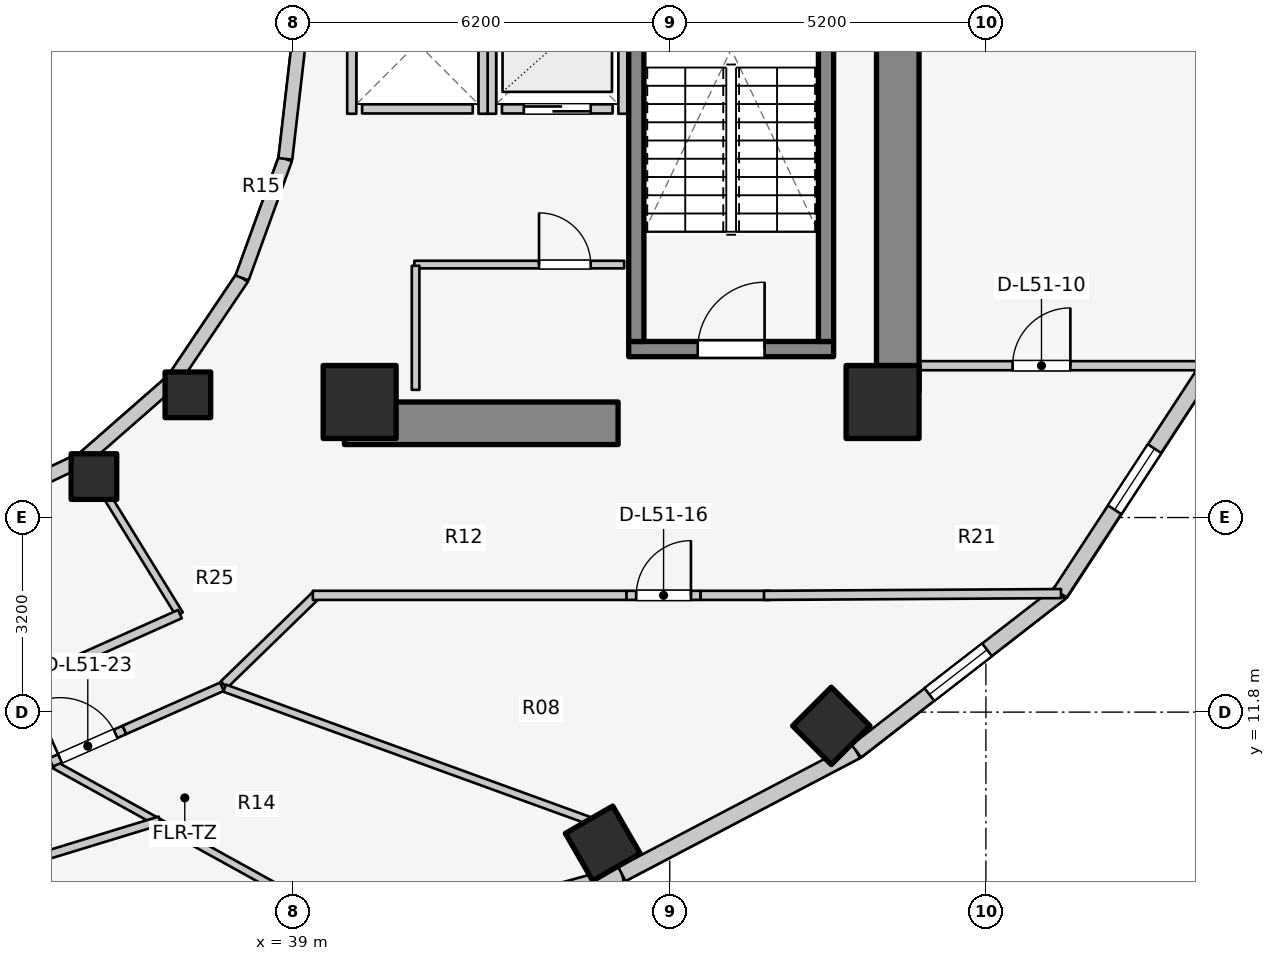
"""IFC4 building model, lengths in metres.
Left out: names, types, materials, properties, quantities, classifications, styles, units other than length and angle.
Written with IfcOpenShell. Run it as: python <this file> out.ifc"""

import sys

from ifc_helpers import new_model, si_unit, direction, frame, frame_2d, origin, origin_2d, place, context, subcontext, project, spatial, rectangle, extrude, element, fill, save


model = new_model("IFC4")
c1 = context("Model", 3, precision=1e-05, world=origin(), true_north=direction((0.0, 1.0)))
c2 = subcontext(c1, "Body", "Model", "MODEL_VIEW")
j1 = project(units=[si_unit("LENGTHUNIT", "METRE"), si_unit("PLANEANGLEUNIT", "RADIAN")], contexts=[c1])
p1 = place(None, origin())
s1 = spatial("IfcSite", under=j1, at=p1, CompositionType="ELEMENT")
p2 = place(p1, origin())
s2 = spatial("IfcBuilding", under=s1, at=p2, CompositionType="ELEMENT")
p3 = place(p2, frame((0.0, 0.0, 168.4)))
s3 = spatial("IfcBuildingStorey", under=s2, at=p3, CompositionType="ELEMENT", Elevation=168.4)
p4 = place(p3, frame((48.95, 17.05, 0.0), z_axis=(0.0, 0.0, 1.0), x_axis=(0.0, 1.0, 0.0)))
e1 = element("IfcWall", 1, at=p4, inside=s3, PredefinedType="SHEAR", context=c2, shape_type="SweptSolid", body=[
    extrude(rectangle(XDim=12.8, YDim=0.7, at=frame_2d((6.4, 0.0))), origin(), (0.0, 0.0, 1.0), 3.1),
])
p5 = place(p3, frame((39.85, 16.55, 0.0), z_axis=(0.0, 0.0, 1.0), x_axis=(1.0, 0.0, 0.0)))
e2 = element("IfcWall", 2, at=p5, inside=s3, PredefinedType="SHEAR", context=c2, shape_type="SweptSolid", body=[
    extrude(rectangle(XDim=4.5, YDim=0.7, at=frame_2d((2.25, 0.0))), origin(), (0.0, 0.0, 1.0), 3.1),
])
p6 = place(p3, frame((44.525, 17.77, 0.0), z_axis=(0.0, 0.0, 1.0), x_axis=(1.0, 0.0, 0.0)))
e3 = element("IfcWall", 3, at=p6, inside=s3, PredefinedType="SOLIDWALL", context=c2, shape_type="SweptSolid", body=[
    extrude(rectangle(XDim=3.37, YDim=0.25, at=frame_2d((1.685, 0.0))), origin(), (0.0, 0.0, 1.0), 3.1),
])
p7 = place(p6, frame((1.135, 0.0, 0.0)))
e4 = element("IfcOpeningElement", 4, at=p7, cuts=e3, PredefinedType="OPENING", context=c2, shape_type="SweptSolid", body=[
    extrude(rectangle(XDim=1.1, YDim=2.1, at=frame_2d((0.55, 1.05))), frame((0.0, 0.135, 0.0), z_axis=(0.0, -1.0, 0.0), x_axis=(1.0, 0.0, 0.0)), (0.0, 0.0, 1.0), 0.27),
])
for number, where, z_axis, x_axis in (
    (5, (44.65, 17.895, 0.0), (0.0, 0.0, 1.0), (0.0, 1.0, 0.0)),
    (6, (47.77, 17.895, 0.0), (0.0, 0.0, 1.0), (0.0, 1.0, 0.0)),
):
    element("IfcWall", number, at=place(p3, frame(where, z_axis=z_axis, x_axis=x_axis)), inside=s3, PredefinedType="SOLIDWALL", context=c2, shape_type="SweptSolid", body=[
        extrude(rectangle(XDim=7.81, YDim=0.25, at=frame_2d((3.905, 0.0))), origin(), (0.0, 0.0, 1.0), 3.1),
    ])
for number, where, z_axis, x_axis in (
    (7, (40.1, 16.9, 0.0), (0.0, 0.0, 1.0), (1.0, 0.0, 0.0)),
    (8, (48.7, 16.9, 0.0), (0.0, 0.0, 1.0), (1.0, 0.0, 0.0)),
):
    element("IfcColumn", number, at=place(p3, frame(where, z_axis=z_axis, x_axis=x_axis)), inside=s3, PredefinedType="COLUMN", context=c2, shape_type="SweptSolid", body=[
        extrude(rectangle(XDim=1.2, YDim=1.2, at=origin_2d()), origin(), (0.0, 0.0, 1.0), 3.1),
    ])
p8 = place(p3, frame((35.73, 15.673, 0.0), z_axis=(0.0, 0.0, 1.0), x_axis=(1.0, 0.0, 0.0)))
e9 = element("IfcColumn", 9, at=p8, inside=s3, PredefinedType="COLUMN", context=c2, shape_type="SweptSolid", body=[
    extrude(rectangle(XDim=0.75, YDim=0.75, at=origin_2d()), origin(), (0.0, 0.0, 1.0), 3.1),
])
p9 = place(p3, frame((44.098, 9.641, 0.0), z_axis=(0.0, 0.0, 1.0), x_axis=(0.5, -0.866025403784, 0.0)))
e10 = element("IfcColumn", 10, at=p9, inside=s3, PredefinedType="COLUMN", context=c2, shape_type="SweptSolid", body=[
    extrude(rectangle(XDim=0.9, YDim=0.9, at=origin_2d()), origin(), (0.0, 0.0, 1.0), 3.1),
])
p10 = place(p3, frame((37.275, 17.018, 0.0), z_axis=(0.0, 0.0, 1.0), x_axis=(1.0, 0.0, 0.0)))
e11 = element("IfcColumn", 11, at=p10, inside=s3, PredefinedType="COLUMN", context=c2, shape_type="SweptSolid", body=[
    extrude(rectangle(XDim=0.75, YDim=0.75, at=origin_2d()), origin(), (0.0, 0.0, 1.0), 3.1),
])
p11 = place(p3, frame((47.857, 11.573, 0.0), z_axis=(0.0, 0.0, 1.0), x_axis=(0.707106781187, -0.707106781187, 0.0)))
e12 = element("IfcColumn", 12, at=p11, inside=s3, PredefinedType="COLUMN", context=c2, shape_type="SweptSolid", body=[
    extrude(rectangle(XDim=0.9, YDim=0.9, at=origin_2d()), origin(), (0.0, 0.0, 1.0), 3.1),
])
p12 = place(p3, frame((33.843, 15.157, 0.0), z_axis=(0.0, 0.0, 1.0), x_axis=(0.904179699603, 0.427152280606, 0.0)))
e13 = element("IfcWall", 13, at=p12, inside=s3, PredefinedType="STANDARD", context=c2, shape_type="SweptSolid", body=[
    extrude(rectangle(XDim=1.899, YDim=0.23, at=frame_2d((0.95, 0.0))), origin(), (0.0, 0.0, 1.0), 1.22),
])
p13 = place(p3, frame((35.56, 15.968, 0.0), z_axis=(0.0, 0.0, 1.0), x_axis=(0.752576694707, 0.658504607869, 0.0)))
e14 = element("IfcWall", 14, at=p13, inside=s3, PredefinedType="STANDARD", context=c2, shape_type="SweptSolid", body=[
    extrude(rectangle(XDim=1.959, YDim=0.23, at=frame_2d((0.98, 0.0))), origin(), (0.0, 0.0, 1.0), 1.22),
])
p14 = place(p3, frame((37.035, 17.258, 0.0), z_axis=(0.0, 0.0, 1.0), x_axis=(0.558197800898, 0.829707909492, 0.0)))
e15 = element("IfcWall", 15, at=p14, inside=s3, PredefinedType="STANDARD", context=c2, shape_type="SweptSolid", body=[
    extrude(rectangle(XDim=2.027, YDim=0.23, at=frame_2d((1.013, 0.0))), origin(), (0.0, 0.0, 1.0), 1.22),
])
p15 = place(p3, frame((38.166, 18.94, 0.0), z_axis=(0.0, 0.0, 1.0), x_axis=(0.341423187295, 0.93990968033, 0.0)))
e16 = element("IfcWall", 16, at=p15, inside=s3, PredefinedType="STANDARD", context=c2, shape_type="SweptSolid", body=[
    extrude(rectangle(XDim=2.084, YDim=0.23, at=frame_2d((1.042, 0.0))), origin(), (0.0, 0.0, 1.0), 2.56),
])
p16 = place(p3, frame((38.877, 20.898, 0.0), z_axis=(0.0, 0.0, 1.0), x_axis=(0.114711713601, 0.993398823617, 0.0)))
e17 = element("IfcWall", 17, at=p16, inside=s3, PredefinedType="STANDARD", context=c2, shape_type="SweptSolid", body=[
    extrude(rectangle(XDim=2.115, YDim=0.23, at=frame_2d((1.058, 0.0))), origin(), (0.0, 0.0, 1.0), 2.56),
])
p17 = place(p3, frame((39.365, 7.743, 0.0), z_axis=(0.0, 0.0, 1.0), x_axis=(0.963953455704, 0.26607092144, 0.0)))
e18 = element("IfcWall", 18, at=p17, inside=s3, PredefinedType="STANDARD", context=c2, shape_type="SweptSolid", body=[
    extrude(rectangle(XDim=5.237, YDim=0.26, at=frame_2d((2.618, 0.0))), origin(), (0.0, 0.0, 1.0), 1.22),
])
p18 = place(p17, frame((2.018, 0.0, 0.15)))
e19 = element("IfcOpeningElement", 19, at=p18, cuts=e18, PredefinedType="OPENING", context=c2, shape_type="SweptSolid", body=[
    extrude(rectangle(XDim=1.2, YDim=0.9, at=frame_2d((0.6, 0.45))), frame((0.0, 0.14, 0.0), z_axis=(0.0, -1.0, 0.0), x_axis=(1.0, 0.0, 0.0)), (0.0, 0.0, 1.0), 0.28),
])
p19 = place(p3, frame((44.413, 9.137, 0.0), z_axis=(0.0, 0.0, 1.0), x_axis=(0.885660265226, 0.464333818065, 0.0)))
e20 = element("IfcWall", 20, at=p19, inside=s3, PredefinedType="STANDARD", context=c2, shape_type="SweptSolid", body=[
    extrude(rectangle(XDim=4.354, YDim=0.26, at=frame_2d((2.177, 0.0))), origin(), (0.0, 0.0, 1.0), 1.22),
])
p20 = place(p3, frame((48.269, 11.158, 0.0), z_axis=(0.0, 0.0, 1.0), x_axis=(0.790185650662, 0.612867552973, 0.0)))
e21 = element("IfcWall", 21, at=p20, inside=s3, PredefinedType="STANDARD", context=c2, shape_type="SweptSolid", body=[
    extrude(rectangle(XDim=4.239, YDim=0.26, at=frame_2d((2.12, 0.0))), origin(), (0.0, 0.0, 1.0), 1.22),
])
p21 = place(p20, frame((1.52, 0.0, 0.15)))
e22 = element("IfcOpeningElement", 22, at=p21, cuts=e21, PredefinedType="OPENING", context=c2, shape_type="SweptSolid", body=[
    extrude(rectangle(XDim=1.2, YDim=0.9, at=frame_2d((0.6, 0.45))), frame((0.0, 0.14, 0.0), z_axis=(0.0, -1.0, 0.0), x_axis=(1.0, 0.0, 0.0)), (0.0, 0.0, 1.0), 0.28),
])
p22 = place(p3, frame((51.619, 13.757, 0.0), z_axis=(0.0, 0.0, 1.0), x_axis=(0.547456494366, 0.836834145322, 0.0)))
e23 = element("IfcWall", 23, at=p22, inside=s3, PredefinedType="STANDARD", context=c2, shape_type="SweptSolid", body=[
    extrude(rectangle(XDim=4.477, YDim=0.26, at=frame_2d((2.239, 0.0))), origin(), (0.0, 0.0, 1.0), 1.22),
])
p23 = place(p22, frame((1.639, 0.0, 0.15)))
e24 = element("IfcOpeningElement", 24, at=p23, cuts=e23, PredefinedType="OPENING", context=c2, shape_type="SweptSolid", body=[
    extrude(rectangle(XDim=1.2, YDim=0.9, at=frame_2d((0.6, 0.45))), frame((0.0, 0.14, 0.0), z_axis=(0.0, -1.0, 0.0), x_axis=(1.0, 0.0, 0.0)), (0.0, 0.0, 1.0), 0.28),
])
p24 = place(p3, frame((42.44, 21.72, 0.0), z_axis=(0.0, 0.0, 1.0), x_axis=(1.0, 0.0, 0.0)))
e25 = element("IfcWall", 25, at=p24, inside=s3, PredefinedType="SOLIDWALL", context=c2, shape_type="SweptSolid", body=[
    extrude(rectangle(XDim=1.82, YDim=0.15, at=frame_2d((0.91, 0.0))), origin(), (0.0, 0.0, 1.0), 2.575),
])
p25 = place(p24, frame((0.36, 0.0, 0.0)))
e26 = element("IfcOpeningElement", 26, at=p25, cuts=e25, PredefinedType="OPENING", context=c2, shape_type="SweptSolid", body=[
    extrude(rectangle(XDim=1.1, YDim=2.1, at=frame_2d((0.55, 1.05))), frame((0.0, 0.085, 0.0), z_axis=(0.0, -1.0, 0.0), x_axis=(1.0, 0.0, 0.0)), (0.0, 0.0, 1.0), 0.17),
])
for number, where, z_axis, x_axis in (
    (27, (42.27, 21.64, 0.0), (0.0, 0.0, 1.0), (0.0, 1.0, 0.0)),
    (28, (44.43, 21.64, 0.0), (0.0, 0.0, 1.0), (0.0, 1.0, 0.0)),
):
    element("IfcWall", number, at=place(p3, frame(where, z_axis=z_axis, x_axis=x_axis)), inside=s3, PredefinedType="SOLIDWALL", context=c2, shape_type="SweptSolid", body=[
        extrude(rectangle(XDim=2.32, YDim=0.15, at=frame_2d((1.16, 0.0))), origin(), (0.0, 0.0, 1.0), 2.575),
    ])
p26 = place(p3, frame((40.14, 21.72, 0.0), z_axis=(0.0, 0.0, 1.0), x_axis=(1.0, 0.0, 0.0)))
e29 = element("IfcWall", 29, at=p26, inside=s3, PredefinedType="SOLIDWALL", context=c2, shape_type="SweptSolid", body=[
    extrude(rectangle(XDim=1.82, YDim=0.15, at=frame_2d((0.91, 0.0))), origin(), (0.0, 0.0, 1.0), 2.12),
])
p27 = place(p3, frame((39.97, 21.64, 0.0), z_axis=(0.0, 0.0, 1.0), x_axis=(0.0, 1.0, 0.0)))
e30 = element("IfcWall", 30, at=p27, inside=s3, PredefinedType="SOLIDWALL", context=c2, shape_type="SweptSolid", body=[
    extrude(rectangle(XDim=2.32, YDim=0.15, at=frame_2d((1.16, 0.0))), origin(), (0.0, 0.0, 1.0), 2.12),
])
p28 = place(p3, frame((42.13, 21.64, 0.0), z_axis=(0.0, 0.0, 1.0), x_axis=(0.0, 1.0, 0.0)))
e31 = element("IfcWall", 31, at=p28, inside=s3, PredefinedType="SOLIDWALL", context=c2, shape_type="SweptSolid", body=[
    extrude(rectangle(XDim=2.32, YDim=0.15, at=frame_2d((1.16, 0.0))), origin(), (0.0, 0.0, 1.0), 2.575),
])
p29 = place(p3, frame((41.0, 19.16, 0.0), z_axis=(0.0, 0.0, 1.0), x_axis=(1.0, 0.0, 0.0)))
e32 = element("IfcWall", 32, at=p29, inside=s3, PredefinedType="PARTITIONING", context=c2, shape_type="SweptSolid", body=[
    extrude(rectangle(XDim=3.45, YDim=0.125, at=frame_2d((1.725, 0.0))), origin(), (0.0, 0.0, 1.0), 2.12),
])
p30 = place(p29, frame((2.05, 0.0, 0.0)))
e33 = element("IfcOpeningElement", 33, at=p30, cuts=e32, PredefinedType="OPENING", context=c2, shape_type="SweptSolid", body=[
    extrude(rectangle(XDim=0.85, YDim=2.05, at=frame_2d((0.425, 1.025))), frame((0.0, 0.073, 0.0), z_axis=(0.0, -1.0, 0.0), x_axis=(1.0, 0.0, 0.0)), (0.0, 0.0, 1.0), 0.145),
])
p31 = place(p3, frame((41.02, 17.1, 0.0), z_axis=(0.0, 0.0, 1.0), x_axis=(0.0, 1.0, 0.0)))
e34 = element("IfcWall", 34, at=p31, inside=s3, PredefinedType="PARTITIONING", context=c2, shape_type="SweptSolid", body=[
    extrude(rectangle(XDim=2.04, YDim=0.125, at=frame_2d((1.02, 0.0))), origin(), (0.0, 0.0, 1.0), 2.575),
])
p32 = place(p3, frame((48.95, 17.497, 0.0), z_axis=(0.0, 0.0, 1.0), x_axis=(1.0, 0.0, 0.0)))
e35 = element("IfcWall", 35, at=p32, inside=s3, PredefinedType="PARTITIONING", context=c2, shape_type="SweptSolid", body=[
    extrude(rectangle(XDim=5.14, YDim=0.15, at=frame_2d((2.57, 0.0))), origin(), (0.0, 0.0, 1.0), 2.575),
])
p33 = place(p32, frame((1.889, 0.0, 0.0)))
e36 = element("IfcOpeningElement", 36, at=p33, cuts=e35, PredefinedType="OPENING", context=c2, shape_type="SweptSolid", body=[
    extrude(rectangle(XDim=0.95, YDim=2.1, at=frame_2d((0.475, 1.05))), frame((0.0, 0.085, 0.0), z_axis=(0.0, -1.0, 0.0), x_axis=(1.0, 0.0, 0.0)), (0.0, 0.0, 1.0), 0.17),
])
p34 = place(p3, frame((37.867, 12.251, 0.0), z_axis=(0.0, 0.0, 1.0), x_axis=(0.717419568599, 0.696641344302, 0.0)))
e37 = element("IfcWall", 37, at=p34, inside=s3, PredefinedType="PARTITIONING", context=c2, shape_type="SweptSolid", body=[
    extrude(rectangle(XDim=2.138, YDim=0.15, at=frame_2d((1.069, 0.0))), origin(), (0.0, 0.0, 1.0), 1.22),
])
p35 = place(p3, frame((39.33, 13.72, 0.0), z_axis=(0.0, 0.0, 1.0), x_axis=(1.0, 0.0, 0.0)))
e38 = element("IfcWall", 38, at=p35, inside=s3, PredefinedType="PARTITIONING", context=c2, shape_type="SweptSolid", body=[
    extrude(rectangle(XDim=5.158, YDim=0.15, at=frame_2d((2.579, 0.0))), origin(), (0.0, 0.0, 1.0), 1.22),
])
p36 = place(p3, frame((44.489, 13.72, 0.0), z_axis=(0.0, 0.0, 1.0), x_axis=(1.0, 0.0, 0.0)))
e39 = element("IfcWall", 39, at=p36, inside=s3, PredefinedType="PARTITIONING", context=c2, shape_type="SweptSolid", body=[
    extrude(rectangle(XDim=1.22, YDim=0.15, at=frame_2d((0.61, 0.0))), origin(), (0.0, 0.0, 1.0), 2.16),
])
p37 = place(p36, frame((0.16, 0.0, 0.0)))
e40 = element("IfcOpeningElement", 40, at=p37, cuts=e39, PredefinedType="OPENING", context=c2, shape_type="SweptSolid", body=[
    extrude(rectangle(XDim=0.9, YDim=2.1, at=frame_2d((0.45, 1.05))), frame((0.0, 0.085, 0.0), z_axis=(0.0, -1.0, 0.0), x_axis=(1.0, 0.0, 0.0)), (0.0, 0.0, 1.0), 0.17),
])
p38 = place(p3, frame((45.708, 13.72, 0.0), z_axis=(0.0, 0.0, 1.0), x_axis=(1.0, 0.0, 0.0)))
e41 = element("IfcWall", 41, at=p38, inside=s3, PredefinedType="PARTITIONING", context=c2, shape_type="SweptSolid", body=[
    extrude(rectangle(XDim=1.142, YDim=0.15, at=frame_2d((0.571, 0.0))), origin(), (0.0, 0.0, 1.0), 2.575),
])
p39 = place(p3, frame((46.75, 13.72, 0.0), z_axis=(0.0, 0.0, 1.0), x_axis=(0.999981712056, 0.006047772638, 0.0)))
e42 = element("IfcWall", 42, at=p39, inside=s3, PredefinedType="PARTITIONING", context=c2, shape_type="SweptSolid", body=[
    extrude(rectangle(XDim=4.885, YDim=0.15, at=frame_2d((2.442, 0.0))), origin(), (0.0, 0.0, 1.0), 1.22),
])
p40 = place(p3, frame((35.55, 15.985, 0.0), z_axis=(0.0, 0.0, 1.0), x_axis=(0.524565340045, -0.851370192116, 0.0)))
e43 = element("IfcWall", 43, at=p40, inside=s3, PredefinedType="PARTITIONING", context=c2, shape_type="SweptSolid", body=[
    extrude(rectangle(XDim=3.027, YDim=0.125, at=frame_2d((1.514, 0.0))), origin(), (0.0, 0.0, 1.0), 1.22),
])
p41 = place(p3, frame((34.658, 12.301, 0.0), z_axis=(0.0, 0.0, 1.0), x_axis=(0.912985265053, 0.407992531545, 0.0)))
e44 = element("IfcWall", 44, at=p41, inside=s3, PredefinedType="PARTITIONING", context=c2, shape_type="SweptSolid", body=[
    extrude(rectangle(XDim=2.723, YDim=0.15, at=frame_2d((1.362, 0.0))), origin(), (0.0, 0.0, 1.0), 1.22),
])
p42 = place(p3, frame((35.065, 10.942, 0.0), z_axis=(0.0, 0.0, 1.0), x_axis=(0.875077338582, -0.48398311076, 0.0)))
e45 = element("IfcWall", 45, at=p42, inside=s3, PredefinedType="PARTITIONING", context=c2, shape_type="SweptSolid", body=[
    extrude(rectangle(XDim=4.573, YDim=0.125, at=frame_2d((2.287, 0.0))), origin(), (0.0, 0.0, 1.0), 1.22),
])
p43 = place(p3, frame((37.88, 12.194, 0.0), z_axis=(0.0, 0.0, 1.0), x_axis=(0.939901628116, -0.341445353557, 0.0)))
e46 = element("IfcWall", 46, at=p43, inside=s3, PredefinedType="PARTITIONING", context=c2, shape_type="SweptSolid", body=[
    extrude(rectangle(XDim=6.387, YDim=0.125, at=frame_2d((3.194, 0.0))), origin(), (0.0, 0.0, 1.0), 1.22),
])
p44 = place(p3, frame((31.95, 10.537, 0.0), z_axis=(0.0, 0.0, 1.0), x_axis=(0.990254405439, 0.139270285808, 0.0)))
e47 = element("IfcWall", 47, at=p44, inside=s3, PredefinedType="PARTITIONING", context=c2, shape_type="SweptSolid", body=[
    extrude(rectangle(XDim=3.147, YDim=0.15, at=frame_2d((1.573, 0.0))), origin(), (0.0, 0.0, 1.0), 1.22),
])
p45 = place(p3, frame((34.967, 9.45, 0.0), z_axis=(0.0, 0.0, 1.0), x_axis=(0.956342743061, 0.292247425644, 0.0)))
e48 = element("IfcWall", 48, at=p45, inside=s3, PredefinedType="PLUMBINGWALL", context=c2, shape_type="SweptSolid", body=[
    extrude(rectangle(XDim=1.932, YDim=0.14, at=frame_2d((0.966, 0.0))), origin(), (0.0, 0.0, 1.0), 2.575),
])
p46 = place(p3, frame((35.025, 10.973, 0.0), z_axis=(0.0, 0.0, 1.0), x_axis=(0.914382646268, 0.404851054345, 0.0)))
e49 = element("IfcWall", 49, at=p46, inside=s3, PredefinedType="PARTITIONING", context=c2, shape_type="SweptSolid", body=[
    extrude(rectangle(XDim=1.32, YDim=0.15, at=frame_2d((0.66, 0.0))), origin(), (0.0, 0.0, 1.0), 2.16),
])
p47 = place(p46, frame((0.16, 0.0, 0.0)))
e50 = element("IfcOpeningElement", 50, at=p47, cuts=e49, PredefinedType="OPENING", context=c2, shape_type="SweptSolid", body=[
    extrude(rectangle(XDim=1.0, YDim=2.1, at=frame_2d((0.5, 1.05))), frame((0.0, 0.085, 0.0), z_axis=(0.0, -1.0, 0.0), x_axis=(1.0, 0.0, 0.0)), (0.0, 0.0, 1.0), 0.17),
])
p48 = place(p3, frame((36.232, 11.508, 0.0), z_axis=(0.0, 0.0, 1.0), x_axis=(0.91447091359, 0.404651638077, 0.0)))
e51 = element("IfcWall", 51, at=p48, inside=s3, PredefinedType="PARTITIONING", context=c2, shape_type="SweptSolid", body=[
    extrude(rectangle(XDim=1.753, YDim=0.15, at=frame_2d((0.876, 0.0))), origin(), (0.0, 0.0, 1.0), 1.22),
])
p49 = place(p21, origin())
e52 = element("IfcWindow", 52, at=p49, inside=s3, PartitioningType="SINGLE_PANEL", PredefinedType="WINDOW", context=c2, shape_type="SweptSolid", body=[
    extrude(rectangle(XDim=1.2, YDim=0.9, at=frame_2d((0.6, 0.45))), frame((0.0, 0.03, 0.0), z_axis=(0.0, -1.0, 0.0), x_axis=(1.0, 0.0, 0.0)), (0.0, 0.0, 1.0), 0.06),
])
fill(e22, e52)
p50 = place(p23, origin())
e53 = element("IfcWindow", 53, at=p50, inside=s3, PartitioningType="SINGLE_PANEL", PredefinedType="WINDOW", context=c2, shape_type="SweptSolid", body=[
    extrude(rectangle(XDim=1.2, YDim=0.9, at=frame_2d((0.6, 0.45))), frame((0.0, 0.03, 0.0), z_axis=(0.0, -1.0, 0.0), x_axis=(1.0, 0.0, 0.0)), (0.0, 0.0, 1.0), 0.06),
])
fill(e24, e53)
p51 = place(p7, origin())
e54 = element("IfcDoor", 54, at=p51, inside=s3, OperationType="SINGLE_SWING_RIGHT", PredefinedType="DOOR", context=c2, shape_type="SweptSolid", body=[
    extrude(rectangle(XDim=1.1, YDim=2.1, at=frame_2d((0.55, 1.05))), frame((0.0, 0.025, 0.0), z_axis=(0.0, -1.0, 0.0), x_axis=(1.0, 0.0, 0.0)), (0.0, 0.0, 1.0), 0.05),
])
fill(e4, e54)
p52 = place(p25, origin())
e55 = element("IfcDoor", 55, at=p52, inside=s3, OperationType="DOUBLE_DOOR_SLIDING", PredefinedType="DOOR", context=c2, shape_type="SweptSolid", body=[
    extrude(rectangle(XDim=1.1, YDim=2.1, at=frame_2d((0.55, 1.05))), frame((0.0, 0.025, 0.0), z_axis=(0.0, -1.0, 0.0), x_axis=(1.0, 0.0, 0.0)), (0.0, 0.0, 1.0), 0.05),
])
fill(e26, e55)
p53 = place(p30, origin())
e56 = element("IfcDoor", 56, at=p53, inside=s3, OperationType="SINGLE_SWING_LEFT", PredefinedType="DOOR", context=c2, shape_type="SweptSolid", body=[
    extrude(rectangle(XDim=0.85, YDim=2.05, at=frame_2d((0.425, 1.025))), frame((0.0, 0.025, 0.0), z_axis=(0.0, -1.0, 0.0), x_axis=(1.0, 0.0, 0.0)), (0.0, 0.0, 1.0), 0.05),
])
fill(e33, e56)
p54 = place(p33, origin())
e57 = element("IfcDoor", 57, at=p54, inside=s3, OperationType="SINGLE_SWING_RIGHT", PredefinedType="DOOR", context=c2, shape_type="SweptSolid", body=[
    extrude(rectangle(XDim=0.95, YDim=2.1, at=frame_2d((0.475, 1.05))), frame((0.0, 0.025, 0.0), z_axis=(0.0, -1.0, 0.0), x_axis=(1.0, 0.0, 0.0)), (0.0, 0.0, 1.0), 0.05),
])
fill(e36, e57)
p55 = place(p37, origin())
e58 = element("IfcDoor", 58, at=p55, inside=s3, OperationType="SINGLE_SWING_RIGHT", PredefinedType="DOOR", context=c2, shape_type="SweptSolid", body=[
    extrude(rectangle(XDim=0.9, YDim=2.1, at=frame_2d((0.45, 1.05))), frame((0.0, 0.025, 0.0), z_axis=(0.0, -1.0, 0.0), x_axis=(1.0, 0.0, 0.0)), (0.0, 0.0, 1.0), 0.05),
])
fill(e40, e58)
p56 = place(p47, origin())
e59 = element("IfcDoor", 59, at=p56, inside=s3, OperationType="SINGLE_SWING_LEFT", PredefinedType="DOOR", context=c2, shape_type="SweptSolid", body=[
    extrude(rectangle(XDim=1.0, YDim=2.1, at=frame_2d((0.5, 1.05))), frame((0.0, 0.025, 0.0), z_axis=(0.0, -1.0, 0.0), x_axis=(1.0, 0.0, 0.0)), (0.0, 0.0, 1.0), 0.05),
])
fill(e50, e59)
save(model, sys.argv[1])
